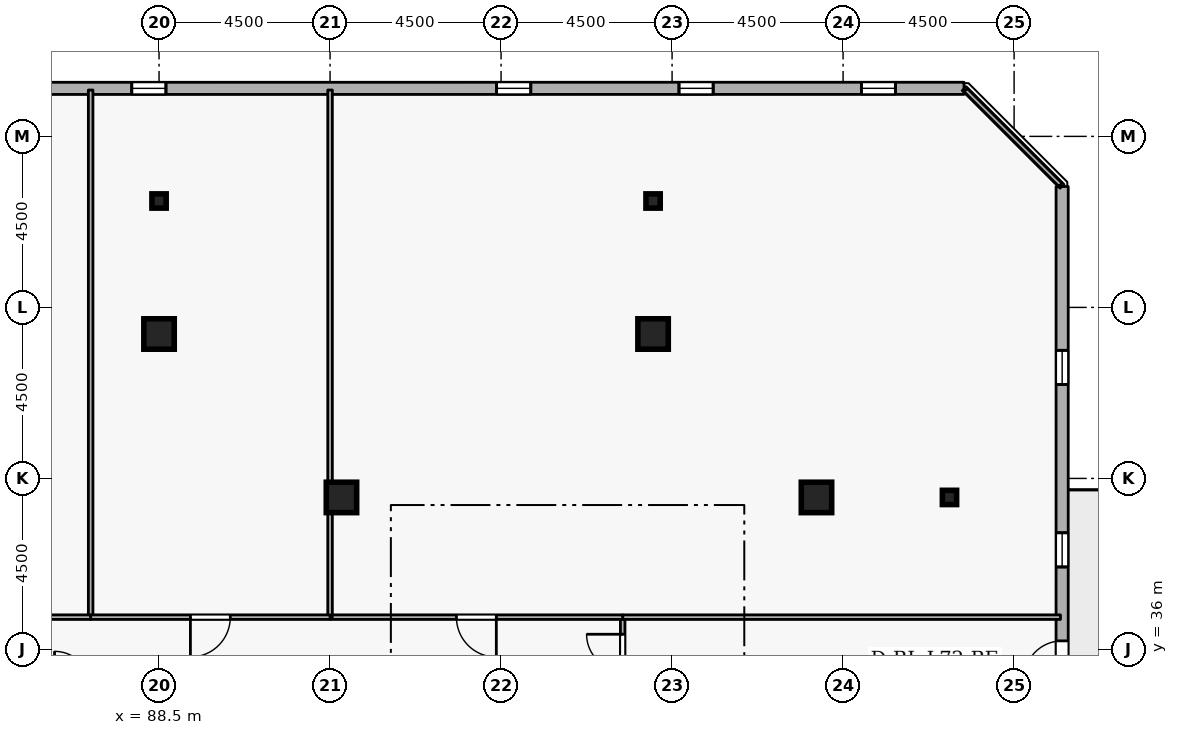
"""IFC4 building model, lengths in metres.
Left out: names, types, materials, properties, quantities, classifications, styles, units other than length and angle.
Written with IfcOpenShell. Run it as: python <this file> out.ifc"""

import sys

from ifc_helpers import new_model, si_unit, direction, frame, frame_2d, origin, origin_2d, place, context, subcontext, project, spatial, rectangle, i_section, extrude, element, fill, save


model = new_model("IFC4")
c1 = context("Model", 3, precision=1e-05, world=origin(), true_north=direction((0.0, 1.0)))
c2 = subcontext(c1, "Body", "Model", "MODEL_VIEW")
j1 = project(units=[si_unit("LENGTHUNIT", "METRE"), si_unit("PLANEANGLEUNIT", "RADIAN")], contexts=[c1])
p1 = place(None, origin())
s1 = spatial("IfcSite", under=j1, at=p1, CompositionType="ELEMENT")
p2 = place(p1, origin())
s2 = spatial("IfcBuilding", under=s1, at=p2, CompositionType="ELEMENT")
p3 = place(p2, frame((0.0, 0.0, 269.1)))
s3 = spatial("IfcBuildingStorey", under=s2, at=p3, CompositionType="ELEMENT", Elevation=269.1)
for number, where, z_axis, x_axis in (
    (1, (105.8, 40.0, 0.0), (0.0, 0.0, 1.0), (1.0, 0.0, 0.0)),
    (2, (101.5, 44.3, 0.0), (0.0, 0.0, 1.0), (1.0, 0.0, 0.0)),
    (3, (88.5, 44.3, 0.0), (0.0, 0.0, 1.0), (1.0, 0.0, 0.0)),
    (4, (93.3, 40.0, 0.0), (0.0, 0.0, 1.0), (1.0, 0.0, 0.0)),
):
    element("IfcColumn", number, at=place(p3, frame(where, z_axis=z_axis, x_axis=x_axis)), inside=s3, PredefinedType="COLUMN", context=c2, shape_type="SweptSolid", body=[
        extrude(rectangle(XDim=0.8, YDim=0.8, at=origin_2d()), origin(), (0.0, 0.0, 1.0), 3.6),
    ])
for number, where, z_axis, x_axis in (
    (5, (109.3, 40.0, 0.0), (0.0, 0.0, 1.0), (1.0, 0.0, 0.0)),
    (6, (101.5, 47.8, 0.0), (0.0, 0.0, 1.0), (1.0, 0.0, 0.0)),
    (7, (88.5, 47.8, 0.0), (0.0, 0.0, 1.0), (1.0, 0.0, 0.0)),
):
    element("IfcColumn", number, at=place(p3, frame(where, z_axis=z_axis, x_axis=x_axis)), inside=s3, PredefinedType="COLUMN", context=c2, shape_type="SweptSolid", body=[
        extrude(i_section(OverallWidth=0.375, OverallDepth=0.375, WebThickness=0.017, FlangeThickness=0.027, FilletRadius=0.015, at=origin_2d()), origin(), (0.0, 0.0, 1.0), 3.6),
    ])
p4 = place(p3, frame((112.263, 12.371, 0.0), z_axis=(0.0, 0.0, 1.0), x_axis=(5.4540124e-05, 0.999999998513, 0.0)))
e8 = element("IfcWall", 8, at=p4, inside=s3, PredefinedType="STANDARD", context=c2, shape_type="SweptSolid", body=[
    extrude(rectangle(XDim=35.811, YDim=0.32, at=frame_2d((17.905, 0.0))), origin(), (0.0, 0.0, 1.0), 2.7),
])
p5 = place(p4, frame((22.855, 0.0, 0.0)))
e9 = element("IfcOpeningElement", 9, at=p5, cuts=e8, PredefinedType="OPENING", context=c2, shape_type="SweptSolid", body=[
    extrude(rectangle(XDim=1.0, YDim=2.08, at=frame_2d((0.5, 1.04))), frame((0.0, 0.17, 0.0), z_axis=(0.0, -1.0, 0.0), x_axis=(1.0, 0.0, 0.0)), (0.0, 0.0, 1.0), 0.34),
])
p6 = place(p4, frame((1.8, 0.0, 0.72)))
e10 = element("IfcOpeningElement", 10, at=p6, cuts=e8, PredefinedType="OPENING", context=c2, shape_type="SweptSolid", body=[
    extrude(rectangle(XDim=0.9, YDim=1.75, at=frame_2d((0.45, 0.875))), frame((0.0, 0.17, 0.0), z_axis=(0.0, -1.0, 0.0), x_axis=(1.0, 0.0, 0.0)), (0.0, 0.0, 1.0), 0.34),
])
p7 = place(p4, frame((6.6, 0.0, 0.72)))
e11 = element("IfcOpeningElement", 11, at=p7, cuts=e8, PredefinedType="OPENING", context=c2, shape_type="SweptSolid", body=[
    extrude(rectangle(XDim=0.9, YDim=1.75, at=frame_2d((0.45, 0.875))), frame((0.0, 0.17, 0.0), z_axis=(0.0, -1.0, 0.0), x_axis=(1.0, 0.0, 0.0)), (0.0, 0.0, 1.0), 0.34),
])
p8 = place(p4, frame((11.4, 0.0, 0.72)))
e12 = element("IfcOpeningElement", 12, at=p8, cuts=e8, PredefinedType="OPENING", context=c2, shape_type="SweptSolid", body=[
    extrude(rectangle(XDim=0.9, YDim=1.75, at=frame_2d((0.45, 0.875))), frame((0.0, 0.17, 0.0), z_axis=(0.0, -1.0, 0.0), x_axis=(1.0, 0.0, 0.0)), (0.0, 0.0, 1.0), 0.34),
])
p9 = place(p4, frame((16.2, 0.0, 0.72)))
e13 = element("IfcOpeningElement", 13, at=p9, cuts=e8, PredefinedType="OPENING", context=c2, shape_type="SweptSolid", body=[
    extrude(rectangle(XDim=0.9, YDim=1.75, at=frame_2d((0.45, 0.875))), frame((0.0, 0.17, 0.0), z_axis=(0.0, -1.0, 0.0), x_axis=(1.0, 0.0, 0.0)), (0.0, 0.0, 1.0), 0.34),
])
p10 = place(p4, frame((21.0, 0.0, 0.72)))
e14 = element("IfcOpeningElement", 14, at=p10, cuts=e8, PredefinedType="OPENING", context=c2, shape_type="SweptSolid", body=[
    extrude(rectangle(XDim=0.9, YDim=1.75, at=frame_2d((0.45, 0.875))), frame((0.0, 0.17, 0.0), z_axis=(0.0, -1.0, 0.0), x_axis=(1.0, 0.0, 0.0)), (0.0, 0.0, 1.0), 0.34),
])
p11 = place(p4, frame((25.8, 0.0, 0.72)))
e15 = element("IfcOpeningElement", 15, at=p11, cuts=e8, PredefinedType="OPENING", context=c2, shape_type="SweptSolid", body=[
    extrude(rectangle(XDim=0.9, YDim=1.75, at=frame_2d((0.45, 0.875))), frame((0.0, 0.17, 0.0), z_axis=(0.0, -1.0, 0.0), x_axis=(1.0, 0.0, 0.0)), (0.0, 0.0, 1.0), 0.34),
])
p12 = place(p4, frame((30.6, 0.0, 0.72)))
e16 = element("IfcOpeningElement", 16, at=p12, cuts=e8, PredefinedType="OPENING", context=c2, shape_type="SweptSolid", body=[
    extrude(rectangle(XDim=0.9, YDim=1.75, at=frame_2d((0.45, 0.875))), frame((0.0, 0.17, 0.0), z_axis=(0.0, -1.0, 0.0), x_axis=(1.0, 0.0, 0.0)), (0.0, 0.0, 1.0), 0.34),
])
p13 = place(p3, frame((109.681, 50.765, 0.0), z_axis=(0.0, 0.0, 1.0), x_axis=(-0.999999998513, -5.4540124e-05, 0.0)))
e17 = element("IfcWall", 17, at=p13, inside=s3, PredefinedType="STANDARD", context=c2, shape_type="SweptSolid", body=[
    extrude(rectangle(XDim=35.811, YDim=0.32, at=frame_2d((17.905, 0.0))), origin(), (0.0, 0.0, 1.0), 2.7),
])
p14 = place(p13, frame((1.8, 0.0, 0.72)))
e18 = element("IfcOpeningElement", 18, at=p14, cuts=e17, PredefinedType="OPENING", context=c2, shape_type="SweptSolid", body=[
    extrude(rectangle(XDim=0.9, YDim=1.75, at=frame_2d((0.45, 0.875))), frame((0.0, 0.17, 0.0), z_axis=(0.0, -1.0, 0.0), x_axis=(1.0, 0.0, 0.0)), (0.0, 0.0, 1.0), 0.34),
])
p15 = place(p13, frame((6.6, 0.0, 0.72)))
e19 = element("IfcOpeningElement", 19, at=p15, cuts=e17, PredefinedType="OPENING", context=c2, shape_type="SweptSolid", body=[
    extrude(rectangle(XDim=0.9, YDim=1.75, at=frame_2d((0.45, 0.875))), frame((0.0, 0.17, 0.0), z_axis=(0.0, -1.0, 0.0), x_axis=(1.0, 0.0, 0.0)), (0.0, 0.0, 1.0), 0.34),
])
p16 = place(p13, frame((11.4, 0.0, 0.72)))
e20 = element("IfcOpeningElement", 20, at=p16, cuts=e17, PredefinedType="OPENING", context=c2, shape_type="SweptSolid", body=[
    extrude(rectangle(XDim=0.9, YDim=1.75, at=frame_2d((0.45, 0.875))), frame((0.0, 0.17, 0.0), z_axis=(0.0, -1.0, 0.0), x_axis=(1.0, 0.0, 0.0)), (0.0, 0.0, 1.0), 0.34),
])
p17 = place(p13, frame((21.0, 0.0, 0.72)))
e21 = element("IfcOpeningElement", 21, at=p17, cuts=e17, PredefinedType="OPENING", context=c2, shape_type="SweptSolid", body=[
    extrude(rectangle(XDim=0.9, YDim=1.75, at=frame_2d((0.45, 0.875))), frame((0.0, 0.17, 0.0), z_axis=(0.0, -1.0, 0.0), x_axis=(1.0, 0.0, 0.0)), (0.0, 0.0, 1.0), 0.34),
])
p18 = place(p13, frame((25.8, 0.0, 0.72)))
e22 = element("IfcOpeningElement", 22, at=p18, cuts=e17, PredefinedType="OPENING", context=c2, shape_type="SweptSolid", body=[
    extrude(rectangle(XDim=0.9, YDim=1.75, at=frame_2d((0.45, 0.875))), frame((0.0, 0.17, 0.0), z_axis=(0.0, -1.0, 0.0), x_axis=(1.0, 0.0, 0.0)), (0.0, 0.0, 1.0), 0.34),
])
p19 = place(p13, frame((30.6, 0.0, 0.72)))
e23 = element("IfcOpeningElement", 23, at=p19, cuts=e17, PredefinedType="OPENING", context=c2, shape_type="SweptSolid", body=[
    extrude(rectangle(XDim=0.9, YDim=1.75, at=frame_2d((0.45, 0.875))), frame((0.0, 0.17, 0.0), z_axis=(0.0, -1.0, 0.0), x_axis=(1.0, 0.0, 0.0)), (0.0, 0.0, 1.0), 0.34),
])
p20 = place(p3, frame((100.7, 35.0, 0.0), z_axis=(0.0, 0.0, 1.0), x_axis=(0.0, 1.0, 0.0)))
e24 = element("IfcWall", 24, at=p20, inside=s3, PredefinedType="PARTITIONING", context=c2, shape_type="SweptSolid", body=[
    extrude(rectangle(XDim=1.85, YDim=0.12, at=frame_2d((0.925, 0.0))), origin(), (0.0, 0.0, 1.0), 3.34),
])
p21 = place(p20, frame((0.45, 0.0, 0.0)))
e25 = element("IfcOpeningElement", 25, at=p21, cuts=e24, PredefinedType="OPENING", context=c2, shape_type="SweptSolid", body=[
    extrude(rectangle(XDim=0.95, YDim=2.1, at=frame_2d((0.475, 1.05))), frame((0.0, 0.07, 0.0), z_axis=(0.0, -1.0, 0.0), x_axis=(1.0, 0.0, 0.0)), (0.0, 0.0, 1.0), 0.14),
])
p22 = place(p3, frame((100.7, 36.85, 0.0), z_axis=(0.0, 0.0, 1.0), x_axis=(1.0, 0.0, 0.0)))
e26 = element("IfcWall", 26, at=p22, inside=s3, PredefinedType="PARTITIONING", context=c2, shape_type="SweptSolid", body=[
    extrude(rectangle(XDim=11.52, YDim=0.12, at=frame_2d((5.76, 0.0))), origin(), (0.0, 0.0, 1.0), 3.34),
])
p23 = place(p3, frame((100.7, 36.85, 0.0), z_axis=(0.0, 0.0, 1.0), x_axis=(-1.0, 0.0, 0.0)))
e27 = element("IfcWall", 27, at=p23, inside=s3, PredefinedType="PARTITIONING", context=c2, shape_type="SweptSolid", body=[
    extrude(rectangle(XDim=7.7, YDim=0.12, at=frame_2d((3.85, 0.0))), origin(), (0.0, 0.0, 1.0), 3.34),
])
p24 = place(p23, frame((3.325, 0.0, 0.0)))
e28 = element("IfcOpeningElement", 28, at=p24, cuts=e27, PredefinedType="OPENING", context=c2, shape_type="SweptSolid", body=[
    extrude(rectangle(XDim=1.05, YDim=2.1, at=frame_2d((0.525, 1.05))), frame((0.0, 0.07, 0.0), z_axis=(0.0, -1.0, 0.0), x_axis=(1.0, 0.0, 0.0)), (0.0, 0.0, 1.0), 0.14),
])
p25 = place(p3, frame((93.0, 36.85, 0.0), z_axis=(0.0, 0.0, 1.0), x_axis=(0.0, 1.0, 0.0)))
e29 = element("IfcWall", 29, at=p25, inside=s3, PredefinedType="PARTITIONING", context=c2, shape_type="SweptSolid", body=[
    extrude(rectangle(XDim=13.87, YDim=0.12, at=frame_2d((6.935, 0.0))), origin(), (0.0, 0.0, 1.0), 3.34),
])
p26 = place(p3, frame((109.725, 50.72, 0.0), z_axis=(0.0, 0.0, 1.0), x_axis=(0.707106781187, -0.707106781187, 0.0)))
e30 = element("IfcWall", 30, at=p26, inside=s3, PredefinedType="PARTITIONING", context=c2, shape_type="SweptSolid", body=[
    extrude(rectangle(XDim=3.528, YDim=0.12, at=frame_2d((1.764, 0.0))), origin(), (0.0, 0.0, 1.0), 3.34),
])
p27 = place(p3, frame((86.7, 36.85, 0.0), z_axis=(0.0, 0.0, 1.0), x_axis=(0.0, 1.0, 0.0)))
e31 = element("IfcWall", 31, at=p27, inside=s3, PredefinedType="PARTITIONING", context=c2, shape_type="SweptSolid", body=[
    extrude(rectangle(XDim=13.87, YDim=0.12, at=frame_2d((6.935, 0.0))), origin(), (0.0, 0.0, 1.0), 3.34),
])
p28 = place(p3, frame((93.0, 36.85, 0.0), z_axis=(0.0, 0.0, 1.0), x_axis=(-1.0, 0.0, 0.0)))
e32 = element("IfcWall", 32, at=p28, inside=s3, PredefinedType="PARTITIONING", context=c2, shape_type="SweptSolid", body=[
    extrude(rectangle(XDim=6.3, YDim=0.12, at=frame_2d((3.15, 0.0))), origin(), (0.0, 0.0, 1.0), 3.34),
])
p29 = place(p28, frame((2.625, 0.0, 0.0)))
e33 = element("IfcOpeningElement", 33, at=p29, cuts=e32, PredefinedType="OPENING", context=c2, shape_type="SweptSolid", body=[
    extrude(rectangle(XDim=1.05, YDim=2.1, at=frame_2d((0.525, 1.05))), frame((0.0, 0.07, 0.0), z_axis=(0.0, -1.0, 0.0), x_axis=(1.0, 0.0, 0.0)), (0.0, 0.0, 1.0), 0.14),
])
p30 = place(p3, frame((86.7, 36.85, 0.0), z_axis=(0.0, 0.0, 1.0), x_axis=(-1.0, 0.0, 0.0)))
e34 = element("IfcWall", 34, at=p30, inside=s3, PredefinedType="PARTITIONING", context=c2, shape_type="SweptSolid", body=[
    extrude(rectangle(XDim=4.5, YDim=0.12, at=frame_2d((2.25, 0.0))), origin(), (0.0, 0.0, 1.0), 3.34),
])
p31 = place(p30, frame((1.725, 0.0, 0.0)))
e35 = element("IfcOpeningElement", 35, at=p31, cuts=e34, PredefinedType="OPENING", context=c2, shape_type="SweptSolid", body=[
    extrude(rectangle(XDim=1.05, YDim=2.1, at=frame_2d((0.525, 1.05))), frame((0.0, 0.07, 0.0), z_axis=(0.0, -1.0, 0.0), x_axis=(1.0, 0.0, 0.0)), (0.0, 0.0, 1.0), 0.14),
])
p32 = place(p5, origin())
e36 = element("IfcDoor", 36, at=p32, inside=s3, OperationType="SINGLE_SWING_LEFT", PredefinedType="DOOR", context=c2, shape_type="SweptSolid", body=[
    extrude(rectangle(XDim=1.0, YDim=2.08, at=frame_2d((0.5, 1.04))), frame((0.0, 0.025, 0.0), z_axis=(0.0, -1.0, 0.0), x_axis=(1.0, 0.0, 0.0)), (0.0, 0.0, 1.0), 0.05),
])
fill(e9, e36)
p33 = place(p11, origin())
e37 = element("IfcWindow", 37, at=p33, inside=s3, PartitioningType="SINGLE_PANEL", PredefinedType="WINDOW", context=c2, shape_type="SweptSolid", body=[
    extrude(rectangle(XDim=0.9, YDim=1.75, at=frame_2d((0.45, 0.875))), frame((0.0, 0.03, 0.0), z_axis=(0.0, -1.0, 0.0), x_axis=(1.0, 0.0, 0.0)), (0.0, 0.0, 1.0), 0.06),
])
fill(e15, e37)
p34 = place(p12, origin())
e38 = element("IfcWindow", 38, at=p34, inside=s3, PartitioningType="SINGLE_PANEL", PredefinedType="WINDOW", context=c2, shape_type="SweptSolid", body=[
    extrude(rectangle(XDim=0.9, YDim=1.75, at=frame_2d((0.45, 0.875))), frame((0.0, 0.03, 0.0), z_axis=(0.0, -1.0, 0.0), x_axis=(1.0, 0.0, 0.0)), (0.0, 0.0, 1.0), 0.06),
])
fill(e16, e38)
p35 = place(p14, origin())
e39 = element("IfcWindow", 39, at=p35, inside=s3, PartitioningType="SINGLE_PANEL", PredefinedType="WINDOW", context=c2, shape_type="SweptSolid", body=[
    extrude(rectangle(XDim=0.9, YDim=1.75, at=frame_2d((0.45, 0.875))), frame((0.0, 0.03, 0.0), z_axis=(0.0, -1.0, 0.0), x_axis=(1.0, 0.0, 0.0)), (0.0, 0.0, 1.0), 0.06),
])
fill(e18, e39)
p36 = place(p15, origin())
e40 = element("IfcWindow", 40, at=p36, inside=s3, PartitioningType="SINGLE_PANEL", PredefinedType="WINDOW", context=c2, shape_type="SweptSolid", body=[
    extrude(rectangle(XDim=0.9, YDim=1.75, at=frame_2d((0.45, 0.875))), frame((0.0, 0.03, 0.0), z_axis=(0.0, -1.0, 0.0), x_axis=(1.0, 0.0, 0.0)), (0.0, 0.0, 1.0), 0.06),
])
fill(e19, e40)
p37 = place(p16, origin())
e41 = element("IfcWindow", 41, at=p37, inside=s3, PartitioningType="SINGLE_PANEL", PredefinedType="WINDOW", context=c2, shape_type="SweptSolid", body=[
    extrude(rectangle(XDim=0.9, YDim=1.75, at=frame_2d((0.45, 0.875))), frame((0.0, 0.03, 0.0), z_axis=(0.0, -1.0, 0.0), x_axis=(1.0, 0.0, 0.0)), (0.0, 0.0, 1.0), 0.06),
])
fill(e20, e41)
p38 = place(p17, origin())
e42 = element("IfcWindow", 42, at=p38, inside=s3, PartitioningType="SINGLE_PANEL", PredefinedType="WINDOW", context=c2, shape_type="SweptSolid", body=[
    extrude(rectangle(XDim=0.9, YDim=1.75, at=frame_2d((0.45, 0.875))), frame((0.0, 0.03, 0.0), z_axis=(0.0, -1.0, 0.0), x_axis=(1.0, 0.0, 0.0)), (0.0, 0.0, 1.0), 0.06),
])
fill(e21, e42)
p39 = place(p21, origin())
e43 = element("IfcDoor", 43, at=p39, inside=s3, OperationType="SINGLE_SWING_RIGHT", PredefinedType="DOOR", context=c2, shape_type="SweptSolid", body=[
    extrude(rectangle(XDim=0.95, YDim=2.1, at=frame_2d((0.475, 1.05))), frame((0.0, 0.025, 0.0), z_axis=(0.0, -1.0, 0.0), x_axis=(1.0, 0.0, 0.0)), (0.0, 0.0, 1.0), 0.05),
])
fill(e25, e43)
p40 = place(p24, origin())
e44 = element("IfcDoor", 44, at=p40, inside=s3, OperationType="SINGLE_SWING_LEFT", PredefinedType="DOOR", context=c2, shape_type="SweptSolid", body=[
    extrude(rectangle(XDim=1.05, YDim=2.1, at=frame_2d((0.525, 1.05))), frame((0.0, 0.025, 0.0), z_axis=(0.0, -1.0, 0.0), x_axis=(1.0, 0.0, 0.0)), (0.0, 0.0, 1.0), 0.05),
])
fill(e28, e44)
p41 = place(p29, origin())
e45 = element("IfcDoor", 45, at=p41, inside=s3, OperationType="SINGLE_SWING_RIGHT", PredefinedType="DOOR", context=c2, shape_type="SweptSolid", body=[
    extrude(rectangle(XDim=1.05, YDim=2.1, at=frame_2d((0.525, 1.05))), frame((0.0, 0.025, 0.0), z_axis=(0.0, -1.0, 0.0), x_axis=(1.0, 0.0, 0.0)), (0.0, 0.0, 1.0), 0.05),
])
fill(e33, e45)
save(model, sys.argv[1])
